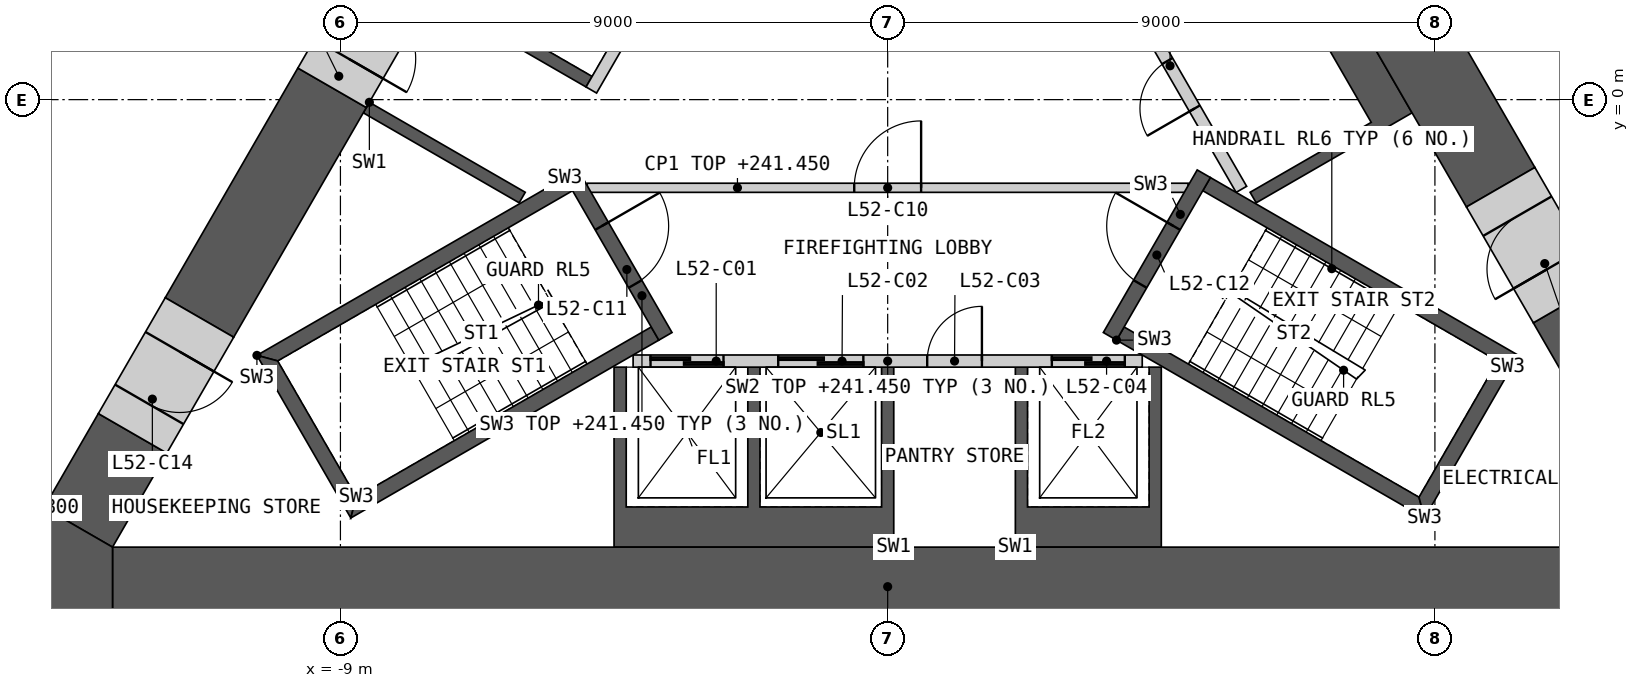
"""IFC4 building model, lengths in metres.
Left out: names, types, materials, properties, quantities, classifications, styles, units other than length and angle.
Written with IfcOpenShell. Run it as: python <this file> out.ifc"""

import sys

from ifc_helpers import new_model, si_unit, direction, frame, frame_2d, origin, place, context, subcontext, project, spatial, polyline, rectangle, outline, extrude, element, fill, save


model = new_model("IFC4")
c1 = context("Model", 3, precision=1e-05, world=origin(), true_north=direction((0.0, 1.0)))
c2 = subcontext(c1, "Body", "Model", "MODEL_VIEW")
j1 = project(units=[si_unit("LENGTHUNIT", "METRE"), si_unit("PLANEANGLEUNIT", "RADIAN")], contexts=[c1])
p1 = place(None, origin())
s1 = spatial("IfcSite", under=j1, at=p1, CompositionType="ELEMENT")
p2 = place(p1, origin())
s2 = spatial("IfcBuilding", under=s1, at=p2, CompositionType="ELEMENT")
p3 = place(p2, frame((0.0, 0.0, 238.2)))
s3 = spatial("IfcBuildingStorey", under=s2, at=p3, CompositionType="ELEMENT", Elevation=238.2)
p4 = place(p3, origin())
e1 = element("IfcWall", 1, at=p4, inside=s3, PredefinedType="SHEAR", context=c2, shape_type="SweptSolid", body=[
    extrude(outline(polyline([(0.1, -7.36), (-4.5, -7.36), (-4.5, -4.4), (-4.3, -4.4), (-4.3, -6.7), (-2.3, -6.7), (-2.3, -4.4), (-2.1, -4.4), (-2.1, -6.7), (-0.1, -6.7), (-0.1, -4.4), (0.1, -4.4), (0.1, -7.36)])), origin(), (0.0, 0.0, 1.0), 3.25),
])
p5 = place(p3, origin())
e2 = element("IfcWall", 2, at=p5, inside=s3, PredefinedType="SHEAR", context=c2, shape_type="SweptSolid", body=[
    extrude(outline(polyline([(2.1, -7.36), (2.1, -4.4), (2.3, -4.4), (2.3, -6.7), (4.3, -6.7), (4.3, -4.4), (4.5, -4.4), (4.5, -7.36), (2.1, -7.36)])), origin(), (0.0, 0.0, 1.0), 3.25),
])
p6 = place(p3, frame((-4.187, -4.3, 0.0), z_axis=(0.0, 0.0, 1.0), x_axis=(1.0, 0.0, 0.0)))
e3 = element("IfcWall", 3, at=p6, inside=s3, PredefinedType="SOLIDWALL", context=c2, shape_type="SweptSolid", body=[
    extrude(rectangle(XDim=8.373, YDim=0.2, at=frame_2d((4.187, 0.0))), origin(), (0.0, 0.0, 1.0), 3.25),
])
p7 = place(p6, frame((0.287, 0.0, 0.0)))
e4 = element("IfcOpeningElement", 4, at=p7, cuts=e3, PredefinedType="OPENING", context=c2, shape_type="SweptSolid", body=[
    extrude(rectangle(XDim=1.2, YDim=2.1, at=frame_2d((0.6, 1.05))), frame((0.0, 0.11, 0.0), z_axis=(0.0, -1.0, 0.0), x_axis=(1.0, 0.0, 0.0)), (0.0, 0.0, 1.0), 0.22),
])
p8 = place(p6, frame((2.387, 0.0, 0.0)))
e5 = element("IfcOpeningElement", 5, at=p8, cuts=e3, PredefinedType="OPENING", context=c2, shape_type="SweptSolid", body=[
    extrude(rectangle(XDim=1.4, YDim=2.1, at=frame_2d((0.7, 1.05))), frame((0.0, 0.11, 0.0), z_axis=(0.0, -1.0, 0.0), x_axis=(1.0, 0.0, 0.0)), (0.0, 0.0, 1.0), 0.22),
])
p9 = place(p6, frame((4.837, 0.0, 0.0)))
e6 = element("IfcOpeningElement", 6, at=p9, cuts=e3, PredefinedType="OPENING", context=c2, shape_type="SweptSolid", body=[
    extrude(rectangle(XDim=0.9, YDim=2.1, at=frame_2d((0.45, 1.05))), frame((0.0, 0.11, 0.0), z_axis=(0.0, -1.0, 0.0), x_axis=(1.0, 0.0, 0.0)), (0.0, 0.0, 1.0), 0.22),
])
p10 = place(p6, frame((6.887, 0.0, 0.0)))
e7 = element("IfcOpeningElement", 7, at=p10, cuts=e3, PredefinedType="OPENING", context=c2, shape_type="SweptSolid", body=[
    extrude(rectangle(XDim=1.2, YDim=2.1, at=frame_2d((0.6, 1.05))), frame((0.0, 0.11, 0.0), z_axis=(0.0, -1.0, 0.0), x_axis=(1.0, 0.0, 0.0)), (0.0, 0.0, 1.0), 0.22),
])
p11 = place(p3, origin())
e8 = element("IfcWall", 8, at=p11, inside=s3, PredefinedType="SHEAR", context=c2, shape_type="SweptSolid", body=[
    extrude(outline(polyline([(6.324, 3.767), (8.624, -0.217), (8.231, -0.444), (6.061, -1.697), (5.96, -1.524), (7.952, -0.374), (5.852, 3.263), (3.861, 2.113), (3.76, 2.287), (5.931, 3.54), (6.324, 3.767)])), origin(), (0.0, 0.0, 1.0), 3.25),
])
p12 = place(p3, frame((5.817, -1.476, 0.0), z_axis=(0.0, 0.0, 1.0), x_axis=(-0.500002616675, 0.866023893041, 0.0)))
e9 = element("IfcWall", 9, at=p12, inside=s3, PredefinedType="SOLIDWALL", context=c2, shape_type="SweptSolid", body=[
    extrude(rectangle(XDim=8.373, YDim=0.2, at=frame_2d((4.187, 0.0))), origin(), (0.0, 0.0, 1.0), 3.25),
])
p13 = place(p12, frame((1.537, 0.0, 0.0)))
e10 = element("IfcOpeningElement", 10, at=p13, cuts=e9, PredefinedType="OPENING", context=c2, shape_type="SweptSolid", body=[
    extrude(rectangle(XDim=0.9, YDim=2.1, at=frame_2d((0.45, 1.05))), frame((0.0, 0.11, 0.0), z_axis=(0.0, -1.0, 0.0), x_axis=(1.0, 0.0, 0.0)), (0.0, 0.0, 1.0), 0.22),
])
p14 = place(p12, frame((4.837, 0.0, 0.0)))
e11 = element("IfcOpeningElement", 11, at=p14, cuts=e9, PredefinedType="OPENING", context=c2, shape_type="SweptSolid", body=[
    extrude(rectangle(XDim=0.9, YDim=2.1, at=frame_2d((0.45, 1.05))), frame((0.0, 0.11, 0.0), z_axis=(0.0, -1.0, 0.0), x_axis=(1.0, 0.0, 0.0)), (0.0, 0.0, 1.0), 0.22),
])
p15 = place(p12, frame((6.937, 0.0, 0.0)))
e12 = element("IfcOpeningElement", 12, at=p15, cuts=e9, PredefinedType="OPENING", context=c2, shape_type="SweptSolid", body=[
    extrude(rectangle(XDim=1.1, YDim=2.1, at=frame_2d((0.55, 1.05))), frame((0.0, 0.11, 0.0), z_axis=(0.0, -1.0, 0.0), x_axis=(1.0, 0.0, 0.0)), (0.0, 0.0, 1.0), 0.22),
])
p16 = place(p3, origin())
e13 = element("IfcWall", 13, at=p16, inside=s3, PredefinedType="SHEAR", context=c2, shape_type="SweptSolid", body=[
    extrude(outline(polyline([(-7.524, 1.688), (-4.124, 7.577), (-3.731, 7.35), (-1.561, 6.097), (-1.66, 5.924), (-3.652, 7.074), (-4.652, 5.342), (-2.66, 4.192), (-2.76, 4.019), (-4.752, 5.169), (-5.752, 3.437), (-3.76, 2.287), (-3.861, 2.113), (-5.852, 3.263), (-6.852, 1.531), (-4.861, 0.381), (-4.96, 0.208), (-7.131, 1.461), (-7.524, 1.688)])), origin(), (0.0, 0.0, 1.0), 3.25),
])
p17 = place(p3, origin())
e14 = element("IfcWall", 14, at=p17, inside=s3, PredefinedType="SHEAR", context=c2, shape_type="SweptSolid", body=[
    extrude(outline(polyline([(-8.524, -0.044), (-8.131, -0.271), (-5.96, -1.524), (-6.061, -1.697), (-8.231, -0.444), (-8.624, -0.217), (-8.524, -0.044)])), origin(), (0.0, 0.0, 1.0), 3.25),
])
p18 = place(p3, frame((-1.631, 5.776, 0.0), z_axis=(0.0, 0.0, 1.0), x_axis=(-0.499992876559, -0.866029516466, 0.0)))
e15 = element("IfcWall", 15, at=p18, inside=s3, PredefinedType="SOLIDWALL", context=c2, shape_type="SweptSolid", body=[
    extrude(rectangle(XDim=6.486, YDim=0.2, at=frame_2d((3.243, 0.0))), origin(), (0.0, 0.0, 1.0), 3.25),
])
p19 = place(p18, frame((0.337, 0.0, 0.0)))
e16 = element("IfcOpeningElement", 16, at=p19, cuts=e15, PredefinedType="OPENING", context=c2, shape_type="SweptSolid", body=[
    extrude(rectangle(XDim=1.1, YDim=2.1, at=frame_2d((0.55, 1.05))), frame((0.0, 0.11, 0.0), z_axis=(0.0, -1.0, 0.0), x_axis=(1.0, 0.0, 0.0)), (0.0, 0.0, 1.0), 0.22),
])
p20 = place(p18, frame((2.537, 0.0, 0.0)))
e17 = element("IfcOpeningElement", 17, at=p20, cuts=e15, PredefinedType="OPENING", context=c2, shape_type="SweptSolid", body=[
    extrude(rectangle(XDim=1.1, YDim=2.1, at=frame_2d((0.55, 1.05))), frame((0.0, 0.11, 0.0), z_axis=(0.0, -1.0, 0.0), x_axis=(1.0, 0.0, 0.0)), (0.0, 0.0, 1.0), 0.22),
])
p21 = place(p3, frame((-4.941, -1.45, 0.0), z_axis=(0.0, 0.0, 1.0), x_axis=(1.0, 0.0, 0.0)))
e18 = element("IfcWall", 18, at=p21, inside=s3, PredefinedType="PARTITIONING", context=c2, shape_type="SweptSolid", body=[
    extrude(rectangle(XDim=9.882, YDim=0.15, at=frame_2d((4.941, 0.0))), origin(), (0.0, 0.0, 1.0), 3.25),
])
p22 = place(p21, frame((4.391, 0.0, 0.0)))
e19 = element("IfcOpeningElement", 19, at=p22, cuts=e18, PredefinedType="OPENING", context=c2, shape_type="SweptSolid", body=[
    extrude(rectangle(XDim=1.1, YDim=2.1, at=frame_2d((0.55, 1.05))), frame((0.0, 0.085, 0.0), z_axis=(0.0, -1.0, 0.0), x_axis=(1.0, 0.0, 0.0)), (0.0, 0.0, 1.0), 0.17),
])
p23 = place(p3, origin())
e20 = element("IfcWall", 20, at=p23, inside=s3, PredefinedType="SHEAR", context=c2, shape_type="SweptSolid", body=[
    extrude(outline(polyline([(-5.307, -1.281), (-10.374, -4.206), (-10.032, -4.298), (-5.182, -1.498), (-5.307, -1.281)])), origin(), (0.0, 0.0, 1.0), 3.25),
])
p24 = place(p3, origin())
e21 = element("IfcWall", 21, at=p24, inside=s3, PredefinedType="SHEAR", context=c2, shape_type="SweptSolid", body=[
    extrude(outline(polyline([(-10.374, -4.206), (-8.83, -6.881), (-8.738, -6.539), (-10.032, -4.298), (-10.374, -4.206)])), origin(), (0.0, 0.0, 1.0), 3.25),
])
p25 = place(p3, origin())
e22 = element("IfcWall", 22, at=p25, inside=s3, PredefinedType="SHEAR", context=c2, shape_type="SweptSolid", body=[
    extrude(outline(polyline([(-8.738, -6.539), (-8.83, -6.881), (-3.763, -3.956), (-3.888, -3.739), (-8.738, -6.539)])), origin(), (0.0, 0.0, 1.0), 3.25),
])
p26 = place(p3, frame((-5.199, -1.219, 0.0), z_axis=(0.0, 0.0, 1.0), x_axis=(0.499982516597, -0.866035497597, 0.0)))
e23 = element("IfcWall", 23, at=p26, inside=s3, PredefinedType="SHEAR", context=c2, shape_type="SweptSolid", body=[
    extrude(rectangle(XDim=3.088, YDim=0.25, at=frame_2d((1.544, 0.0))), origin(), (0.0, 0.0, 1.0), 3.25),
])
p27 = place(p26, frame((0.994, 0.0, 0.0)))
e24 = element("IfcOpeningElement", 24, at=p27, cuts=e23, PredefinedType="OPENING", context=c2, shape_type="SweptSolid", body=[
    extrude(rectangle(XDim=1.1, YDim=2.1, at=frame_2d((0.55, 1.05))), frame((0.0, 0.135, 0.0), z_axis=(0.0, -1.0, 0.0), x_axis=(1.0, 0.0, 0.0)), (0.0, 0.0, 1.0), 0.27),
])
p28 = place(p3, origin())
e25 = element("IfcWall", 25, at=p28, inside=s3, PredefinedType="SHEAR", context=c2, shape_type="SweptSolid", body=[
    extrude(outline(polyline([(3.763, -3.956), (8.83, -6.881), (8.738, -6.539), (3.888, -3.739), (3.763, -3.956)])), origin(), (0.0, 0.0, 1.0), 3.25),
])
p29 = place(p3, origin())
e26 = element("IfcWall", 26, at=p29, inside=s3, PredefinedType="SHEAR", context=c2, shape_type="SweptSolid", body=[
    extrude(outline(polyline([(8.83, -6.881), (10.374, -4.206), (10.032, -4.298), (8.738, -6.539), (8.83, -6.881)])), origin(), (0.0, 0.0, 1.0), 3.25),
])
p30 = place(p3, origin())
e27 = element("IfcWall", 27, at=p30, inside=s3, PredefinedType="SHEAR", context=c2, shape_type="SweptSolid", body=[
    extrude(outline(polyline([(10.032, -4.298), (10.374, -4.206), (5.307, -1.281), (5.182, -1.498), (10.032, -4.298)])), origin(), (0.0, 0.0, 1.0), 3.25),
])
p31 = place(p3, frame((3.655, -3.893, 0.0), z_axis=(0.0, 0.0, 1.0), x_axis=(0.499982516597, 0.866035497597, 0.0)))
e28 = element("IfcWall", 28, at=p31, inside=s3, PredefinedType="SHEAR", context=c2, shape_type="SweptSolid", body=[
    extrude(rectangle(XDim=3.088, YDim=0.25, at=frame_2d((1.544, 0.0))), origin(), (0.0, 0.0, 1.0), 3.25),
])
p32 = place(p31, frame((0.994, 0.0, 0.0)))
e29 = element("IfcOpeningElement", 29, at=p32, cuts=e28, PredefinedType="OPENING", context=c2, shape_type="SweptSolid", body=[
    extrude(rectangle(XDim=1.1, YDim=2.1, at=frame_2d((0.55, 1.05))), frame((0.0, 0.135, 0.0), z_axis=(0.0, -1.0, 0.0), x_axis=(1.0, 0.0, 0.0)), (0.0, 0.0, 1.0), 0.27),
])
p33 = place(p3, frame((-12.748, -8.01, 0.0), z_axis=(0.0, 0.0, 1.0), x_axis=(1.0, 0.0, 0.0)))
e30 = element("IfcWall", 30, at=p33, inside=s3, PredefinedType="SHEAR", context=c2, shape_type="SweptSolid", body=[
    extrude(rectangle(XDim=25.497, YDim=1.3, at=frame_2d((12.748, 0.0))), origin(), (0.0, 0.0, 1.0), 3.25),
])
p34 = place(p3, frame((10.081, -1.441, 0.0), z_axis=(0.0, 0.0, 1.0), x_axis=(-0.500012180433, 0.866018371294, 0.0)))
e31 = element("IfcWall", 31, at=p34, inside=s3, PredefinedType="SHEAR", context=c2, shape_type="SweptSolid", body=[
    extrude(rectangle(XDim=15.05, YDim=1.3, at=frame_2d((7.525, 0.0))), origin(), (0.0, 0.0, 1.0), 3.25),
])
p35 = place(p3, frame((13.311, -7.035, 0.0), z_axis=(0.0, 0.0, 1.0), x_axis=(-0.500003555838, 0.866023350811, 0.0)))
e32 = element("IfcWall", 32, at=p35, inside=s3, PredefinedType="SHEAR", context=c2, shape_type="SweptSolid", body=[
    extrude(rectangle(XDim=4.26, YDim=1.3, at=frame_2d((2.13, 0.0))), origin(), (0.0, 0.0, 1.0), 3.25),
])
p36 = place(p3, frame((-9.137, 0.195, 0.0), z_axis=(0.0, 0.0, 1.0), x_axis=(-0.499985697398, -0.866033661238, 0.0)))
e33 = element("IfcWall", 33, at=p36, inside=s3, PredefinedType="SHEAR", context=c2, shape_type="SweptSolid", body=[
    extrude(rectangle(XDim=4.362, YDim=1.3, at=frame_2d((2.181, 0.0))), origin(), (0.0, 0.0, 1.0), 3.25),
])
p37 = place(p3, frame((-12.418, -5.488, 0.0), z_axis=(0.0, 0.0, 1.0), x_axis=(-0.499931460552, -0.866064971437, 0.0)))
e34 = element("IfcWall", 34, at=p37, inside=s3, PredefinedType="SHEAR", context=c2, shape_type="SweptSolid", body=[
    extrude(rectangle(XDim=1.786, YDim=1.3, at=frame_2d((0.893, 0.0))), origin(), (0.0, 0.0, 1.0), 3.25),
])
p38 = place(p3, origin())
e35 = element("IfcWall", 35, at=p38, inside=s3, PredefinedType="SHEAR", context=c2, shape_type="SweptSolid", body=[
    extrude(outline(polyline([(-13.874, -6.71), (-12.748, -7.36), (-12.748, -8.66), (-15.0, -8.66), (-13.874, -6.71)])), origin(), (0.0, 0.0, 1.0), 3.25),
])
p39 = place(p3, frame((-11.318, -3.583, 0.0), z_axis=(0.0, 0.0, 1.0), x_axis=(-0.50002983664, -0.866008176907, 0.0)))
e36 = element("IfcWall", 36, at=p39, inside=s3, PredefinedType="SHEAR", context=c2, shape_type="SweptSolid", body=[
    extrude(rectangle(XDim=2.2, YDim=1.3, at=frame_2d((1.1, 0.0))), origin(), (0.0, 0.0, 1.0), 3.25),
])
p40 = place(p39, frame((0.65, 0.0, 0.0)))
e37 = element("IfcOpeningElement", 37, at=p40, cuts=e36, PredefinedType="OPENING", context=c2, shape_type="SweptSolid", body=[
    extrude(rectangle(XDim=1.0, YDim=2.1, at=frame_2d((0.5, 1.05))), frame((0.0, 0.66, 0.0), z_axis=(0.0, -1.0, 0.0), x_axis=(1.0, 0.0, 0.0)), (0.0, 0.0, 1.0), 1.32),
])
p41 = place(p3, frame((11.181, -3.346, 0.0), z_axis=(0.0, 0.0, 1.0), x_axis=(-0.499946605688, 0.86605622881, 0.0)))
e38 = element("IfcWall", 38, at=p41, inside=s3, PredefinedType="SHEAR", context=c2, shape_type="SweptSolid", body=[
    extrude(rectangle(XDim=2.2, YDim=1.3, at=frame_2d((1.1, 0.0))), origin(), (0.0, 0.0, 1.0), 3.25),
])
p42 = place(p41, frame((0.65, 0.0, 0.0)))
e39 = element("IfcOpeningElement", 39, at=p42, cuts=e38, PredefinedType="OPENING", context=c2, shape_type="SweptSolid", body=[
    extrude(rectangle(XDim=1.0, YDim=2.1, at=frame_2d((0.5, 1.05))), frame((0.0, 0.66, 0.0), z_axis=(0.0, -1.0, 0.0), x_axis=(1.0, 0.0, 0.0)), (0.0, 0.0, 1.0), 1.32),
])
p43 = place(p3, frame((-8.037, 2.1, 0.0), z_axis=(0.0, 0.0, 1.0), x_axis=(-0.50002983664, -0.866008176907, 0.0)))
e40 = element("IfcWall", 40, at=p43, inside=s3, PredefinedType="SHEAR", context=c2, shape_type="SweptSolid", body=[
    extrude(rectangle(XDim=2.2, YDim=1.3, at=frame_2d((1.1, 0.0))), origin(), (0.0, 0.0, 1.0), 3.25),
])
p44 = place(p43, frame((0.55, 0.0, 0.0)))
e41 = element("IfcOpeningElement", 41, at=p44, cuts=e40, PredefinedType="OPENING", context=c2, shape_type="SweptSolid", body=[
    extrude(rectangle(XDim=1.1, YDim=2.1, at=frame_2d((0.55, 1.05))), frame((0.0, 0.66, 0.0), z_axis=(0.0, -1.0, 0.0), x_axis=(1.0, 0.0, 0.0)), (0.0, 0.0, 1.0), 1.32),
])
p45 = place(p3, frame((-18.976, -4.747, 0.0), z_axis=(0.0, 0.0, 1.0), x_axis=(0.499999852422, 0.866025488988, 0.0)))
e42 = element("IfcWall", 42, at=p45, inside=s3, PredefinedType="PARTITIONING", context=c2, shape_type="SweptSolid", body=[
    extrude(rectangle(XDim=27.198, YDim=0.2, at=frame_2d((13.599, 0.0))), origin(), (0.0, 0.0, 1.0), 3.25),
])
p46 = place(p45, frame((25.346, 0.0, 0.0)))
e43 = element("IfcOpeningElement", 43, at=p46, cuts=e42, PredefinedType="OPENING", context=c2, shape_type="SweptSolid", body=[
    extrude(rectangle(XDim=1.1, YDim=2.1, at=frame_2d((0.55, 1.05))), frame((0.0, 0.11, 0.0), z_axis=(0.0, -1.0, 0.0), x_axis=(1.0, 0.0, 0.0)), (0.0, 0.0, 1.0), 0.22),
])
p47 = place(p45, frame((16.713, 0.0, 0.0)))
e44 = element("IfcOpeningElement", 44, at=p47, cuts=e42, PredefinedType="OPENING", context=c2, shape_type="SweptSolid", body=[
    extrude(rectangle(XDim=1.1, YDim=2.1, at=frame_2d((0.55, 1.05))), frame((0.0, 0.11, 0.0), z_axis=(0.0, -1.0, 0.0), x_axis=(1.0, 0.0, 0.0)), (0.0, 0.0, 1.0), 0.22),
])
p48 = place(p45, frame((0.35, 0.0, 0.0)))
e45 = element("IfcOpeningElement", 45, at=p48, cuts=e42, PredefinedType="OPENING", context=c2, shape_type="SweptSolid", body=[
    extrude(rectangle(XDim=1.1, YDim=2.1, at=frame_2d((0.55, 1.05))), frame((0.0, 0.11, 0.0), z_axis=(0.0, -1.0, 0.0), x_axis=(1.0, 0.0, 0.0)), (0.0, 0.0, 1.0), 0.22),
])
p49 = place(p3, frame((9.699, 5.321, 0.0), z_axis=(0.0, 0.0, 1.0), x_axis=(0.49998193945, -0.866035830797, 0.0)))
e46 = element("IfcWall", 46, at=p49, inside=s3, PredefinedType="PARTITIONING", context=c2, shape_type="SweptSolid", body=[
    extrude(rectangle(XDim=9.094, YDim=0.2, at=frame_2d((4.547, 0.0))), origin(), (0.0, 0.0, 1.0), 3.25),
])
p50 = place(p49, frame((5.212, 0.0, 0.0)))
e47 = element("IfcOpeningElement", 47, at=p50, cuts=e46, PredefinedType="OPENING", context=c2, shape_type="SweptSolid", body=[
    extrude(rectangle(XDim=1.0, YDim=2.1, at=frame_2d((0.5, 1.05))), frame((0.0, 0.11, 0.0), z_axis=(0.0, -1.0, 0.0), x_axis=(1.0, 0.0, 0.0)), (0.0, 0.0, 1.0), 0.22),
])
p51 = place(p49, frame((1.162, 0.0, 0.0)))
e48 = element("IfcOpeningElement", 48, at=p51, cuts=e46, PredefinedType="OPENING", context=c2, shape_type="SweptSolid", body=[
    extrude(rectangle(XDim=1.1, YDim=2.1, at=frame_2d((0.55, 1.05))), frame((0.0, 0.11, 0.0), z_axis=(0.0, -1.0, 0.0), x_axis=(1.0, 0.0, 0.0)), (0.0, 0.0, 1.0), 0.22),
])
p52 = place(p7, origin())
e49 = element("IfcDoor", 49, at=p52, inside=s3, OperationType="SLIDING_TO_LEFT", PredefinedType="DOOR", context=c2, shape_type="SweptSolid", body=[
    extrude(rectangle(XDim=1.2, YDim=2.1, at=frame_2d((0.6, 1.05))), frame((0.0, 0.025, 0.0), z_axis=(0.0, -1.0, 0.0), x_axis=(1.0, 0.0, 0.0)), (0.0, 0.0, 1.0), 0.05),
])
fill(e4, e49)
p53 = place(p8, origin())
e50 = element("IfcDoor", 50, at=p53, inside=s3, OperationType="SLIDING_TO_LEFT", PredefinedType="DOOR", context=c2, shape_type="SweptSolid", body=[
    extrude(rectangle(XDim=1.4, YDim=2.1, at=frame_2d((0.7, 1.05))), frame((0.0, 0.025, 0.0), z_axis=(0.0, -1.0, 0.0), x_axis=(1.0, 0.0, 0.0)), (0.0, 0.0, 1.0), 0.05),
])
fill(e5, e50)
p54 = place(p9, origin())
e51 = element("IfcDoor", 51, at=p54, inside=s3, OperationType="SINGLE_SWING_RIGHT", PredefinedType="DOOR", context=c2, shape_type="SweptSolid", body=[
    extrude(rectangle(XDim=0.9, YDim=2.1, at=frame_2d((0.45, 1.05))), frame((0.0, 0.025, 0.0), z_axis=(0.0, -1.0, 0.0), x_axis=(1.0, 0.0, 0.0)), (0.0, 0.0, 1.0), 0.05),
])
fill(e6, e51)
p55 = place(p10, origin())
e52 = element("IfcDoor", 52, at=p55, inside=s3, OperationType="SLIDING_TO_LEFT", PredefinedType="DOOR", context=c2, shape_type="SweptSolid", body=[
    extrude(rectangle(XDim=1.2, YDim=2.1, at=frame_2d((0.6, 1.05))), frame((0.0, 0.025, 0.0), z_axis=(0.0, -1.0, 0.0), x_axis=(1.0, 0.0, 0.0)), (0.0, 0.0, 1.0), 0.05),
])
fill(e7, e52)
p56 = place(p13, origin())
e53 = element("IfcDoor", 53, at=p56, inside=s3, OperationType="SINGLE_SWING_LEFT", PredefinedType="DOOR", context=c2, shape_type="SweptSolid", body=[
    extrude(rectangle(XDim=0.9, YDim=2.1, at=frame_2d((0.45, 1.05))), frame((0.0, 0.025, 0.0), z_axis=(0.0, -1.0, 0.0), x_axis=(1.0, 0.0, 0.0)), (0.0, 0.0, 1.0), 0.05),
])
fill(e10, e53)
p57 = place(p22, origin())
e54 = element("IfcDoor", 54, at=p57, inside=s3, OperationType="SINGLE_SWING_RIGHT", PredefinedType="DOOR", context=c2, shape_type="SweptSolid", body=[
    extrude(rectangle(XDim=1.1, YDim=2.1, at=frame_2d((0.55, 1.05))), frame((0.0, 0.025, 0.0), z_axis=(0.0, -1.0, 0.0), x_axis=(1.0, 0.0, 0.0)), (0.0, 0.0, 1.0), 0.05),
])
fill(e19, e54)
p58 = place(p27, origin())
e55 = element("IfcDoor", 55, at=p58, inside=s3, OperationType="SINGLE_SWING_LEFT", PredefinedType="DOOR", context=c2, shape_type="SweptSolid", body=[
    extrude(rectangle(XDim=1.1, YDim=2.1, at=frame_2d((0.55, 1.05))), frame((0.0, 0.025, 0.0), z_axis=(0.0, -1.0, 0.0), x_axis=(1.0, 0.0, 0.0)), (0.0, 0.0, 1.0), 0.05),
])
fill(e24, e55)
p59 = place(p32, origin())
e56 = element("IfcDoor", 56, at=p59, inside=s3, OperationType="SINGLE_SWING_RIGHT", PredefinedType="DOOR", context=c2, shape_type="SweptSolid", body=[
    extrude(rectangle(XDim=1.1, YDim=2.1, at=frame_2d((0.55, 1.05))), frame((0.0, 0.025, 0.0), z_axis=(0.0, -1.0, 0.0), x_axis=(1.0, 0.0, 0.0)), (0.0, 0.0, 1.0), 0.05),
])
fill(e29, e56)
p60 = place(p40, origin())
e57 = element("IfcDoor", 57, at=p60, inside=s3, OperationType="SINGLE_SWING_LEFT", PredefinedType="DOOR", context=c2, shape_type="SweptSolid", body=[
    extrude(rectangle(XDim=1.0, YDim=2.1, at=frame_2d((0.5, 1.05))), frame((0.0, 0.405, 0.0), z_axis=(0.0, -1.0, 0.0), x_axis=(1.0, 0.0, 0.0)), (0.0, 0.0, 1.0), 0.05),
])
fill(e37, e57)
p61 = place(p42, origin())
e58 = element("IfcDoor", 58, at=p61, inside=s3, OperationType="SINGLE_SWING_LEFT", PredefinedType="DOOR", context=c2, shape_type="SweptSolid", body=[
    extrude(rectangle(XDim=1.0, YDim=2.1, at=frame_2d((0.5, 1.05))), frame((0.0, 0.405, 0.0), z_axis=(0.0, -1.0, 0.0), x_axis=(1.0, 0.0, 0.0)), (0.0, 0.0, 1.0), 0.05),
])
fill(e39, e58)
p62 = place(p44, origin())
e59 = element("IfcDoor", 59, at=p62, inside=s3, OperationType="SINGLE_SWING_RIGHT", PredefinedType="DOOR", context=c2, shape_type="SweptSolid", body=[
    extrude(rectangle(XDim=1.1, YDim=2.1, at=frame_2d((0.55, 1.05))), frame((0.0, 0.405, 0.0), z_axis=(0.0, -1.0, 0.0), x_axis=(1.0, 0.0, 0.0)), (0.0, 0.0, 1.0), 0.05),
])
fill(e41, e59)
save(model, sys.argv[1])
